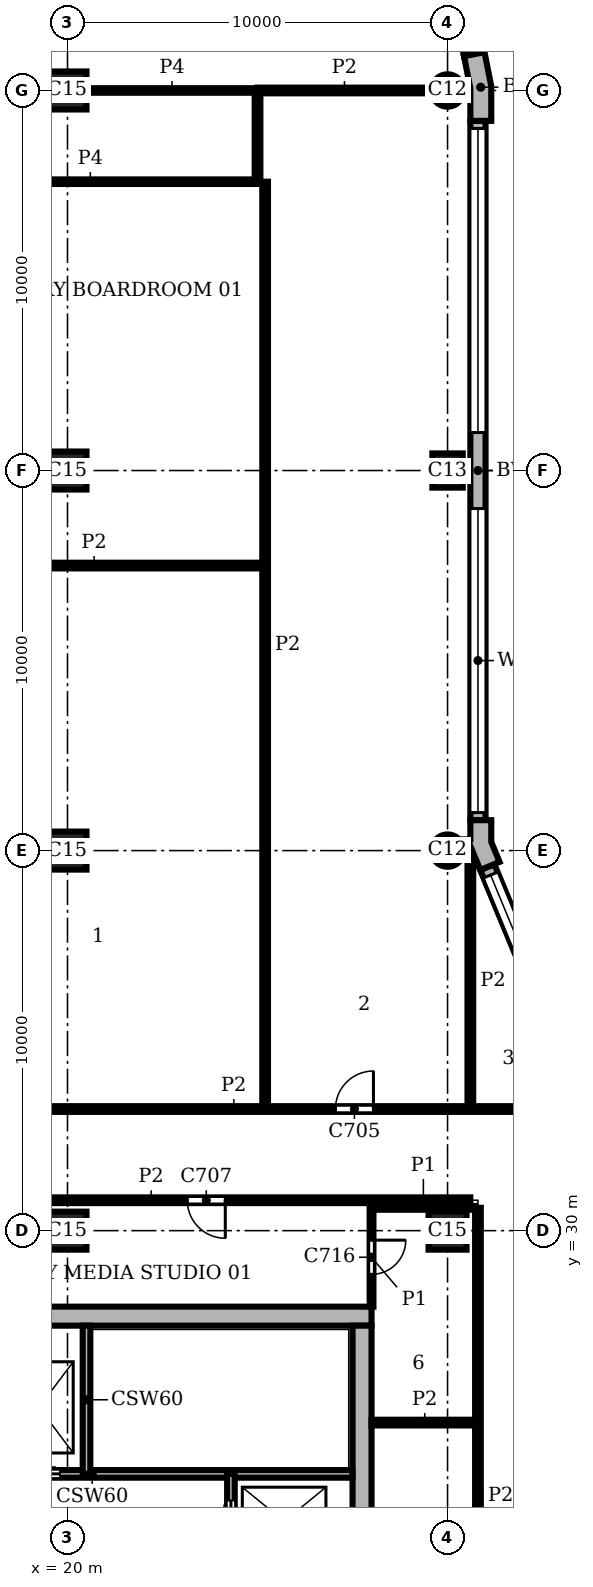
"""IFC4 building model, lengths in metres.
Left out: names, types, materials, properties, quantities, classifications, styles, units other than length and angle.
Written with IfcOpenShell. Run it as: python <this file> out.ifc"""

import sys

from ifc_helpers import new_model, si_unit, direction, frame, frame_2d, origin, origin_2d, place, context, subcontext, project, spatial, polyline, rectangle, circle, outline, extrude, element, fill, save


model = new_model("IFC4")
c1 = context("Model", 3, precision=1e-05, world=origin(), true_north=direction((0.0, 1.0)))
c2 = subcontext(c1, "Body", "Model", "MODEL_VIEW")
j1 = project(units=[si_unit("LENGTHUNIT", "METRE"), si_unit("PLANEANGLEUNIT", "RADIAN")], contexts=[c1])
p1 = place(None, origin())
s1 = spatial("IfcSite", under=j1, at=p1, CompositionType="ELEMENT")
p2 = place(p1, origin())
s2 = spatial("IfcBuilding", under=s1, at=p2, CompositionType="ELEMENT")
p3 = place(p2, frame((0.0, 0.0, 306.0)))
s3 = spatial("IfcBuildingStorey", under=s2, at=p3, CompositionType="ELEMENT", Elevation=306.0)
p4 = place(p3, frame((30.0, 40.0, 0.0), z_axis=(0.0, 0.0, 1.0), x_axis=(1.0, 0.0, 0.0)))
e1 = element("IfcColumn", 1, at=p4, inside=s3, PredefinedType="COLUMN", context=c2, shape_type="SweptSolid", body=[
    extrude(circle(Radius=0.425, at=origin_2d()), origin(), (0.0, 0.0, 1.0), 3.9),
])
p5 = place(p3, frame((30.0, 50.0, 0.0), z_axis=(0.0, 0.0, 1.0), x_axis=(0.0, 1.0, 0.0)))
e2 = element("IfcColumn", 2, at=p5, inside=s3, PredefinedType="COLUMN", context=c2, shape_type="SweptSolid", body=[
    extrude(rectangle(XDim=0.9, YDim=0.8, at=origin_2d()), origin(), (0.0, 0.0, 1.0), 3.9),
])
p6 = place(p3, frame((30.0, 60.0, 0.0), z_axis=(0.0, 0.0, 1.0), x_axis=(1.0, 0.0, 0.0)))
e3 = element("IfcColumn", 3, at=p6, inside=s3, PredefinedType="COLUMN", context=c2, shape_type="SweptSolid", body=[
    extrude(circle(Radius=0.425, at=origin_2d()), origin(), (0.0, 0.0, 1.0), 3.9),
])
for number, where, z_axis, x_axis in (
    (4, (20.0, 30.0, 0.0), (0.0, 0.0, 1.0), (1.0, 0.0, 0.0)),
    (5, (20.0, 40.0, 0.0), (0.0, 0.0, 1.0), (1.0, 0.0, 0.0)),
    (6, (20.0, 50.0, 0.0), (0.0, 0.0, 1.0), (1.0, 0.0, 0.0)),
    (7, (20.0, 60.0, 0.0), (0.0, 0.0, 1.0), (1.0, 0.0, 0.0)),
    (8, (30.0, 30.0, 0.0), (0.0, 0.0, 1.0), (1.0, 0.0, 0.0)),
):
    element("IfcColumn", number, at=place(p3, frame(where, z_axis=z_axis, x_axis=x_axis)), inside=s3, PredefinedType="COLUMN", context=c2, shape_type="SweptSolid", body=[
        extrude(rectangle(XDim=1.0, YDim=1.0, at=origin_2d()), origin(), (0.0, 0.0, 1.0), 3.9),
    ])
p7 = place(p3, frame((27.75, 8.5, 0.0), z_axis=(0.0, 0.0, 1.0), x_axis=(0.0, 1.0, 0.0)))
e9 = element("IfcWall", 9, at=p7, inside=s3, PredefinedType="SHEAR", context=c2, shape_type="SweptSolid", body=[
    extrude(rectangle(XDim=19.0, YDim=0.5, at=frame_2d((9.5, 0.0))), origin(), (0.0, 0.0, 1.0), 3.9),
])
p8 = place(p7, frame((4.95, 0.0, 0.0)))
e10 = element("IfcOpeningElement", 10, at=p8, cuts=e9, PredefinedType="OPENING", context=c2, shape_type="SweptSolid", body=[
    extrude(rectangle(XDim=1.6, YDim=2.1, at=frame_2d((0.8, 1.05))), frame((0.0, 0.26, 0.0), z_axis=(0.0, -1.0, 0.0), x_axis=(1.0, 0.0, 0.0)), (0.0, 0.0, 1.0), 0.52),
])
p9 = place(p3, frame((28.0, 27.75, 0.0), z_axis=(0.0, 0.0, 1.0), x_axis=(-1.0, 0.0, 0.0)))
e11 = element("IfcWall", 11, at=p9, inside=s3, PredefinedType="SHEAR", context=c2, shape_type="SweptSolid", body=[
    extrude(rectangle(XDim=20.0, YDim=0.5, at=frame_2d((10.0, 0.0))), origin(), (0.0, 0.0, 1.0), 3.9),
])
p10 = place(p3, origin())
e12 = element("IfcWall", 12, at=p10, inside=s3, PredefinedType="SOLIDWALL", context=c2, shape_type="SweptSolid", body=[
    extrude(outline(polyline([(30.62, 39.995), (30.62, 40.071), (30.861, 39.49), (31.23, 39.644), (31.369, 39.701), (31.15, 40.229), (31.15, 40.8), (31.0, 40.8), (30.6, 40.8), (30.6, 40.295), (30.425, 40.295), (30.425, 39.995), (30.62, 39.995)])), origin(), (0.0, 0.0, 1.0), 3.9),
])
e13 = element("IfcWall", 13, at=p10, inside=s3, PredefinedType="SOLIDWALL", context=c2, shape_type="SweptSolid", body=[
    extrude(outline(polyline([(31.0, 59.2), (31.15, 59.2), (31.15, 60.113), (30.972, 61.009), (30.825, 60.98), (30.432, 60.902), (30.6, 60.059), (30.6, 59.2), (31.0, 59.2)])), origin(), (0.0, 0.0, 1.0), 3.9),
])
p11 = place(p3, frame((33.362, 33.974, 0.0), z_axis=(0.0, 0.0, 1.0), x_axis=(-0.382655745237, 0.923891000409, 0.0)))
e14 = element("IfcWall", 14, at=p11, inside=s3, PredefinedType="SOLIDWALL", context=c2, shape_type="SweptSolid", body=[
    extrude(rectangle(XDim=6.053, YDim=0.4, at=frame_2d((3.027, 0.0))), origin(), (0.0, 0.0, 1.0), 3.9),
])
p12 = place(p11, frame((0.227, 0.0, 0.9)))
e15 = element("IfcOpeningElement", 15, at=p12, cuts=e14, PredefinedType="OPENING", context=c2, shape_type="SweptSolid", body=[
    extrude(rectangle(XDim=5.6, YDim=2.35, at=frame_2d((2.8, 1.175))), frame((0.0, 0.21, 0.0), z_axis=(0.0, -1.0, 0.0), x_axis=(1.0, 0.0, 0.0)), (0.0, 0.0, 1.0), 0.42),
])
p13 = place(p3, frame((30.8, 40.8, 0.0), z_axis=(0.0, 0.0, 1.0), x_axis=(0.0, 1.0, 0.0)))
e16 = element("IfcWall", 16, at=p13, inside=s3, PredefinedType="SOLIDWALL", context=c2, shape_type="SweptSolid", body=[
    extrude(rectangle(XDim=18.4, YDim=0.4, at=frame_2d((9.2, 0.0))), origin(), (0.0, 0.0, 1.0), 3.9),
])
p14 = place(p13, frame((0.2, 0.0, 0.9)))
e17 = element("IfcOpeningElement", 17, at=p14, cuts=e16, PredefinedType="OPENING", context=c2, shape_type="SweptSolid", body=[
    extrude(rectangle(XDim=8.0, YDim=2.35, at=frame_2d((4.0, 1.175))), frame((0.0, 0.21, 0.0), z_axis=(0.0, -1.0, 0.0), x_axis=(1.0, 0.0, 0.0)), (0.0, 0.0, 1.0), 0.42),
])
p15 = place(p13, frame((10.2, 0.0, 0.9)))
e18 = element("IfcOpeningElement", 18, at=p15, cuts=e16, PredefinedType="OPENING", context=c2, shape_type="SweptSolid", body=[
    extrude(rectangle(XDim=8.0, YDim=2.35, at=frame_2d((4.0, 1.175))), frame((0.0, 0.21, 0.0), z_axis=(0.0, -1.0, 0.0), x_axis=(1.0, 0.0, 0.0)), (0.0, 0.0, 1.0), 0.42),
])
p16 = place(p3, frame((30.629, 60.941, 0.0), z_axis=(0.0, 0.0, 1.0), x_axis=(-0.195098533057, 0.98078364709, 0.0)))
e19 = element("IfcWall", 19, at=p16, inside=s3, PredefinedType="SOLIDWALL", context=c2, shape_type="SweptSolid", body=[
    extrude(rectangle(XDim=4.753, YDim=0.4, at=frame_2d((2.376, 0.0))), origin(), (0.0, 0.0, 1.0), 3.9),
])
p17 = place(p16, frame((0.226, 0.0, 0.9)))
e20 = element("IfcOpeningElement", 20, at=p17, cuts=e19, PredefinedType="OPENING", context=c2, shape_type="SweptSolid", body=[
    extrude(rectangle(XDim=4.3, YDim=2.35, at=frame_2d((2.15, 1.175))), frame((0.0, 0.21, 0.0), z_axis=(0.0, -1.0, 0.0), x_axis=(1.0, 0.0, 0.0)), (0.0, 0.0, 1.0), 0.42),
])
p18 = place(p3, frame((13.8, 23.6, 0.0), z_axis=(0.0, 0.0, 1.0), x_axis=(1.0, 0.0, 0.0)))
e21 = element("IfcWall", 21, at=p18, inside=s3, PredefinedType="SHEAR", context=c2, shape_type="SweptSolid", body=[
    extrude(rectangle(XDim=13.7, YDim=0.2, at=frame_2d((6.85, 0.0))), origin(), (0.0, 0.0, 1.0), 3.58),
])
p19 = place(p18, frame((2.4, 0.0, 0.0)))
e22 = element("IfcOpeningElement", 22, at=p19, cuts=e21, PredefinedType="OPENING", context=c2, shape_type="SweptSolid", body=[
    extrude(rectangle(XDim=1.1, YDim=2.1, at=frame_2d((0.55, 1.05))), frame((0.0, 0.11, 0.0), z_axis=(0.0, -1.0, 0.0), x_axis=(1.0, 0.0, 0.0)), (0.0, 0.0, 1.0), 0.22),
])
p20 = place(p18, frame((4.9, 0.0, 0.0)))
e23 = element("IfcOpeningElement", 23, at=p20, cuts=e21, PredefinedType="OPENING", context=c2, shape_type="SweptSolid", body=[
    extrude(rectangle(XDim=1.1, YDim=2.1, at=frame_2d((0.55, 1.05))), frame((0.0, 0.11, 0.0), z_axis=(0.0, -1.0, 0.0), x_axis=(1.0, 0.0, 0.0)), (0.0, 0.0, 1.0), 0.22),
])
p21 = place(p18, frame((0.15, 0.0, 0.0)))
e24 = element("IfcOpeningElement", 24, at=p21, cuts=e21, PredefinedType="OPENING", context=c2, shape_type="SweptSolid", body=[
    extrude(rectangle(XDim=1.0, YDim=2.1, at=frame_2d((0.5, 1.05))), frame((0.0, 0.11, 0.0), z_axis=(0.0, -1.0, 0.0), x_axis=(1.0, 0.0, 0.0)), (0.0, 0.0, 1.0), 0.22),
])
p22 = place(p3, frame((20.5, 23.6, 0.0), z_axis=(0.0, 0.0, 1.0), x_axis=(0.0, 1.0, 0.0)))
e25 = element("IfcWall", 25, at=p22, inside=s3, PredefinedType="SHEAR", context=c2, shape_type="SweptSolid", body=[
    extrude(rectangle(XDim=3.9, YDim=0.2, at=frame_2d((1.95, 0.0))), origin(), (0.0, 0.0, 1.0), 3.58),
])
p23 = place(p3, frame((24.3, 16.1, 0.0), z_axis=(0.0, 0.0, 1.0), x_axis=(0.0, 1.0, 0.0)))
e26 = element("IfcWall", 26, at=p23, inside=s3, PredefinedType="SHEAR", context=c2, shape_type="SweptSolid", body=[
    extrude(rectangle(XDim=7.5, YDim=0.2, at=frame_2d((3.75, 0.0))), origin(), (0.0, 0.0, 1.0), 3.58),
])
p24 = place(p23, frame((5.7, 0.0, 0.0)))
e27 = element("IfcOpeningElement", 27, at=p24, cuts=e26, PredefinedType="OPENING", context=c2, shape_type="SweptSolid", body=[
    extrude(rectangle(XDim=1.1, YDim=2.1, at=frame_2d((0.55, 1.05))), frame((0.0, 0.11, 0.0), z_axis=(0.0, -1.0, 0.0), x_axis=(1.0, 0.0, 0.0)), (0.0, 0.0, 1.0), 0.22),
])
p25 = place(p3, frame((28.0, 28.0, 0.0), z_axis=(0.0, 0.0, 1.0), x_axis=(0.0, 1.0, 0.0)))
e28 = element("IfcWall", 28, at=p25, inside=s3, PredefinedType="PARTITIONING", context=c2, shape_type="SweptSolid", body=[
    extrude(rectangle(XDim=2.598, YDim=0.1, at=frame_2d((1.299, 0.0))), origin(), (0.0, 0.0, 1.0), 3.58),
])
p26 = place(p25, frame((0.85, 0.0, 0.0)))
e29 = element("IfcOpeningElement", 29, at=p26, cuts=e28, PredefinedType="OPENING", context=c2, shape_type="SweptSolid", body=[
    extrude(rectangle(XDim=0.9, YDim=2.1, at=frame_2d((0.45, 1.05))), frame((0.0, 0.06, 0.0), z_axis=(0.0, -1.0, 0.0), x_axis=(1.0, 0.0, 0.0)), (0.0, 0.0, 1.0), 0.12),
])
p27 = place(p3, frame((28.002, 30.6, 0.0), z_axis=(0.0, 0.0, 1.0), x_axis=(1.0, 0.0, 0.0)))
e30 = element("IfcWall", 30, at=p27, inside=s3, PredefinedType="PARTITIONING", context=c2, shape_type="SweptSolid", body=[
    extrude(rectangle(XDim=2.723, YDim=0.1, at=frame_2d((1.362, 0.0))), origin(), (0.0, 0.0, 1.0), 3.58),
])
p28 = place(p3, frame((25.0, 57.6, 0.0), z_axis=(0.0, 0.0, 1.0), x_axis=(0.0, 1.0, 0.0)))
e31 = element("IfcWall", 31, at=p28, inside=s3, PredefinedType="PARTITIONING", context=c2, shape_type="SweptSolid", body=[
    extrude(rectangle(XDim=2.4, YDim=0.15, at=frame_2d((1.2, 0.0))), origin(), (0.0, 0.0, 1.0), 3.58),
])
p29 = place(p3, frame((25.2, 33.2, 0.0), z_axis=(0.0, 0.0, 1.0), x_axis=(0.0, 1.0, 0.0)))
e32 = element("IfcWall", 32, at=p29, inside=s3, PredefinedType="PARTITIONING", context=c2, shape_type="SweptSolid", body=[
    extrude(rectangle(XDim=24.4, YDim=0.15, at=frame_2d((12.2, 0.0))), origin(), (0.0, 0.0, 1.0), 3.58),
])
p30 = place(p3, frame((30.6, 33.2, 0.0), z_axis=(0.0, 0.0, 1.0), x_axis=(0.0, 1.0, 0.0)))
e33 = element("IfcWall", 33, at=p30, inside=s3, PredefinedType="PARTITIONING", context=c2, shape_type="SweptSolid", body=[
    extrude(rectangle(XDim=6.738, YDim=0.15, at=frame_2d((3.369, 0.0))), origin(), (0.0, 0.0, 1.0), 3.58),
])
p31 = place(p3, frame((30.8, 15.45, 0.0), z_axis=(0.0, 0.0, 1.0), x_axis=(0.0, 1.0, 0.0)))
e34 = element("IfcWall", 34, at=p31, inside=s3, PredefinedType="PARTITIONING", context=c2, shape_type="SweptSolid", body=[
    extrude(rectangle(XDim=15.15, YDim=0.15, at=frame_2d((7.575, 0.0))), origin(), (0.0, 0.0, 1.0), 3.58),
])
p32 = place(p31, frame((5.35, 0.0, 0.0)))
e35 = element("IfcOpeningElement", 35, at=p32, cuts=e34, PredefinedType="OPENING", context=c2, shape_type="SweptSolid", body=[
    extrude(rectangle(XDim=1.0, YDim=2.1, at=frame_2d((0.5, 1.05))), frame((0.0, 0.085, 0.0), z_axis=(0.0, -1.0, 0.0), x_axis=(1.0, 0.0, 0.0)), (0.0, 0.0, 1.0), 0.17),
])
p33 = place(p3, frame((28.0, 24.95, 0.0), z_axis=(0.0, 0.0, 1.0), x_axis=(1.0, 0.0, 0.0)))
e36 = element("IfcWall", 36, at=p33, inside=s3, PredefinedType="PARTITIONING", context=c2, shape_type="SweptSolid", body=[
    extrude(rectangle(XDim=2.8, YDim=0.15, at=frame_2d((1.4, 0.0))), origin(), (0.0, 0.0, 1.0), 3.58),
])
p34 = place(p3, frame((13.802, 30.8, 0.0), z_axis=(0.0, 0.0, 1.0), x_axis=(1.0, 0.0, 0.0)))
e37 = element("IfcWall", 37, at=p34, inside=s3, PredefinedType="PARTITIONING", context=c2, shape_type="SweptSolid", body=[
    extrude(rectangle(XDim=16.797, YDim=0.15, at=frame_2d((8.398, 0.0))), origin(), (0.0, 0.0, 1.0), 3.58),
])
p35 = place(p34, frame((9.35, 0.0, 0.0)))
e38 = element("IfcOpeningElement", 38, at=p35, cuts=e37, PredefinedType="OPENING", context=c2, shape_type="SweptSolid", body=[
    extrude(rectangle(XDim=1.0, YDim=2.1, at=frame_2d((0.5, 1.05))), frame((0.0, 0.085, 0.0), z_axis=(0.0, -1.0, 0.0), x_axis=(1.0, 0.0, 0.0)), (0.0, 0.0, 1.0), 0.17),
])
p36 = place(p3, frame((16.2, 33.2, 0.0), z_axis=(0.0, 0.0, 1.0), x_axis=(1.0, 0.0, 0.0)))
e39 = element("IfcWall", 39, at=p36, inside=s3, PredefinedType="PARTITIONING", context=c2, shape_type="SweptSolid", body=[
    extrude(rectangle(XDim=16.352, YDim=0.15, at=frame_2d((8.176, 0.0))), origin(), (0.0, 0.0, 1.0), 3.58),
])
p37 = place(p36, frame((10.85, 0.0, 0.0)))
e40 = element("IfcOpeningElement", 40, at=p37, cuts=e39, PredefinedType="OPENING", context=c2, shape_type="SweptSolid", body=[
    extrude(rectangle(XDim=1.0, YDim=2.1, at=frame_2d((0.5, 1.05))), frame((0.0, 0.085, 0.0), z_axis=(0.0, -1.0, 0.0), x_axis=(1.0, 0.0, 0.0)), (0.0, 0.0, 1.0), 0.17),
])
p38 = place(p3, frame((16.2, 47.5, 0.0), z_axis=(0.0, 0.0, 1.0), x_axis=(1.0, 0.0, 0.0)))
e41 = element("IfcWall", 41, at=p38, inside=s3, PredefinedType="PARTITIONING", context=c2, shape_type="SweptSolid", body=[
    extrude(rectangle(XDim=9.0, YDim=0.15, at=frame_2d((4.5, 0.0))), origin(), (0.0, 0.0, 1.0), 3.58),
])
p39 = place(p3, frame((25.0, 60.0, 0.0), z_axis=(0.0, 0.0, 1.0), x_axis=(1.0, 0.0, 0.0)))
e42 = element("IfcWall", 42, at=p39, inside=s3, PredefinedType="PARTITIONING", context=c2, shape_type="SweptSolid", body=[
    extrude(rectangle(XDim=4.575, YDim=0.15, at=frame_2d((2.288, 0.0))), origin(), (0.0, 0.0, 1.0), 3.58),
])
p40 = place(p3, frame((16.2, 57.6, 0.0), z_axis=(0.0, 0.0, 1.0), x_axis=(1.0, 0.0, 0.0)))
e43 = element("IfcWall", 43, at=p40, inside=s3, PredefinedType="PARTITIONING", context=c2, shape_type="SweptSolid", body=[
    extrude(rectangle(XDim=8.8, YDim=0.12, at=frame_2d((4.4, 0.0))), origin(), (0.0, 0.0, 1.0), 3.58),
])
p41 = place(p3, frame((20.5, 60.0, 0.0), z_axis=(0.0, 0.0, 1.0), x_axis=(1.0, 0.0, 0.0)))
e44 = element("IfcWall", 44, at=p41, inside=s3, PredefinedType="PARTITIONING", context=c2, shape_type="SweptSolid", body=[
    extrude(rectangle(XDim=4.5, YDim=0.12, at=frame_2d((2.25, 0.0))), origin(), (0.0, 0.0, 1.0), 3.58),
])
p42 = place(p12, origin())
e45 = element("IfcWindow", 45, at=p42, inside=s3, PartitioningType="SINGLE_PANEL", PredefinedType="WINDOW", context=c2, shape_type="SweptSolid", body=[
    extrude(rectangle(XDim=5.6, YDim=2.35, at=frame_2d((2.8, 1.175))), frame((0.0, 0.16, 0.0), z_axis=(0.0, -1.0, 0.0), x_axis=(1.0, 0.0, 0.0)), (0.0, 0.0, 1.0), 0.06),
])
fill(e15, e45)
p43 = place(p14, origin())
e46 = element("IfcWindow", 46, at=p43, inside=s3, PartitioningType="SINGLE_PANEL", PredefinedType="WINDOW", context=c2, shape_type="SweptSolid", body=[
    extrude(rectangle(XDim=8.0, YDim=2.35, at=frame_2d((4.0, 1.175))), frame((0.0, 0.16, 0.0), z_axis=(0.0, -1.0, 0.0), x_axis=(1.0, 0.0, 0.0)), (0.0, 0.0, 1.0), 0.06),
])
fill(e17, e46)
p44 = place(p15, origin())
e47 = element("IfcWindow", 47, at=p44, inside=s3, PartitioningType="SINGLE_PANEL", PredefinedType="WINDOW", context=c2, shape_type="SweptSolid", body=[
    extrude(rectangle(XDim=8.0, YDim=2.35, at=frame_2d((4.0, 1.175))), frame((0.0, 0.16, 0.0), z_axis=(0.0, -1.0, 0.0), x_axis=(1.0, 0.0, 0.0)), (0.0, 0.0, 1.0), 0.06),
])
fill(e18, e47)
p45 = place(p24, origin())
e48 = element("IfcDoor", 48, at=p45, inside=s3, OperationType="DOUBLE_DOOR_SLIDING", PredefinedType="DOOR", context=c2, shape_type="SweptSolid", body=[
    extrude(rectangle(XDim=1.1, YDim=2.1, at=frame_2d((0.55, 1.05))), frame((0.0, 0.025, 0.0), z_axis=(0.0, -1.0, 0.0), x_axis=(1.0, 0.0, 0.0)), (0.0, 0.0, 1.0), 0.05),
])
fill(e27, e48)
p46 = place(p20, origin())
e49 = element("IfcDoor", 49, at=p46, inside=s3, OperationType="DOUBLE_DOOR_SLIDING", PredefinedType="DOOR", context=c2, shape_type="SweptSolid", body=[
    extrude(rectangle(XDim=1.1, YDim=2.1, at=frame_2d((0.55, 1.05))), frame((0.0, 0.025, 0.0), z_axis=(0.0, -1.0, 0.0), x_axis=(1.0, 0.0, 0.0)), (0.0, 0.0, 1.0), 0.05),
])
fill(e23, e49)
p47 = place(p37, origin())
e50 = element("IfcDoor", 50, at=p47, inside=s3, OperationType="SINGLE_SWING_RIGHT", PredefinedType="DOOR", context=c2, shape_type="SweptSolid", body=[
    extrude(rectangle(XDim=1.0, YDim=2.1, at=frame_2d((0.5, 1.05))), frame((0.0, 0.025, 0.0), z_axis=(0.0, -1.0, 0.0), x_axis=(1.0, 0.0, 0.0)), (0.0, 0.0, 1.0), 0.05),
])
fill(e40, e50)
p48 = place(p35, frame((1.0, 0.0, 0.0), z_axis=(0.0, 0.0, 1.0), x_axis=(-1.0, 0.0, 0.0)))
e51 = element("IfcDoor", 51, at=p48, inside=s3, OperationType="SINGLE_SWING_LEFT", PredefinedType="DOOR", context=c2, shape_type="SweptSolid", body=[
    extrude(rectangle(XDim=1.0, YDim=2.1, at=frame_2d((0.5, 1.05))), frame((0.0, 0.025, 0.0), z_axis=(0.0, -1.0, 0.0), x_axis=(1.0, 0.0, 0.0)), (0.0, 0.0, 1.0), 0.05),
])
fill(e38, e51)
p49 = place(p26, frame((0.9, 0.0, 0.0), z_axis=(0.0, 0.0, 1.0), x_axis=(-1.0, 0.0, 0.0)))
e52 = element("IfcDoor", 52, at=p49, inside=s3, OperationType="SINGLE_SWING_LEFT", PredefinedType="DOOR", context=c2, shape_type="SweptSolid", body=[
    extrude(rectangle(XDim=0.9, YDim=2.1, at=frame_2d((0.45, 1.05))), frame((0.0, 0.025, 0.0), z_axis=(0.0, -1.0, 0.0), x_axis=(1.0, 0.0, 0.0)), (0.0, 0.0, 1.0), 0.05),
])
fill(e29, e52)
save(model, sys.argv[1])
